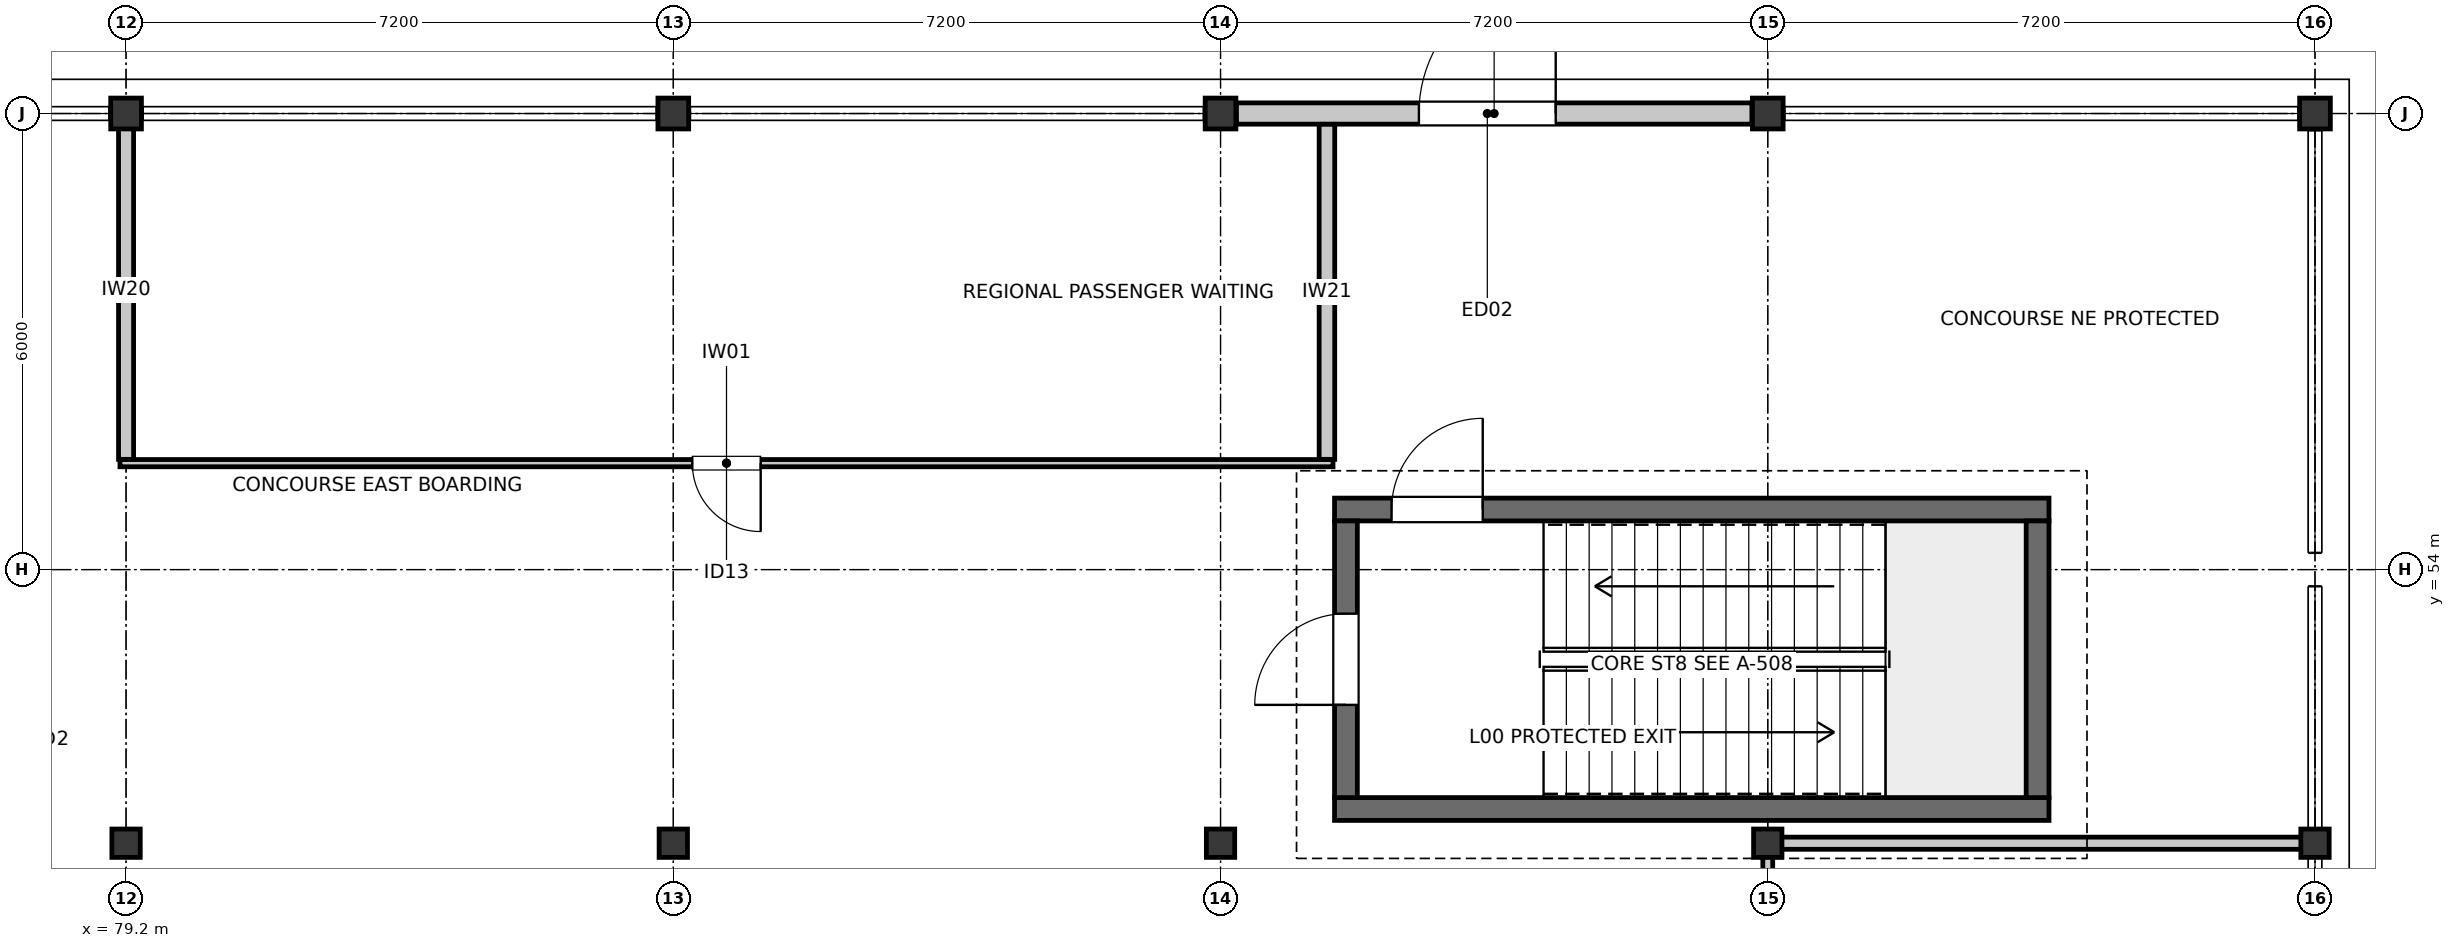
"""IFC4 building model, lengths in metres.
Left out: names, types, materials, properties, quantities, classifications, styles, units other than length and angle.
Written with IfcOpenShell. Run it as: python <this file> out.ifc"""

import sys

from ifc_helpers import new_model, si_unit, direction, frame, frame_2d, origin, origin_2d, place, context, subcontext, project, spatial, rectangle, i_section, extrude, element, fill, save


model = new_model("IFC4")
c1 = context("Model", 3, precision=1e-05, world=origin(), true_north=direction((0.0, 1.0)))
c2 = subcontext(c1, "Body", "Model", "MODEL_VIEW")
j1 = project(units=[si_unit("LENGTHUNIT", "METRE"), si_unit("PLANEANGLEUNIT", "RADIAN")], contexts=[c1])
p1 = place(None, origin())
s1 = spatial("IfcSite", under=j1, at=p1, CompositionType="ELEMENT")
p2 = place(p1, origin())
s2 = spatial("IfcBuilding", under=s1, at=p2, CompositionType="ELEMENT")
p3 = place(p2, origin())
s3 = spatial("IfcBuildingStorey", under=s2, at=p3, CompositionType="ELEMENT", Elevation=0.0)
p4 = place(p3, frame((79.2, 50.4, 0.0), z_axis=(0.0, 0.0, 1.0), x_axis=(1.0, 0.0, 0.0)))
e1 = element("IfcColumn", 1, at=p4, inside=s3, PredefinedType="COLUMN", context=c2, shape_type="SweptSolid", body=[
    extrude(i_section(OverallWidth=0.373, OverallDepth=0.373, WebThickness=0.016, FlangeThickness=0.026, FilletRadius=0.015, at=origin_2d()), origin(), (0.0, 0.0, 1.0), 5.4),
])
p5 = place(p3, frame((79.2, 60.0, 0.0), z_axis=(0.0, 0.0, 1.0), x_axis=(1.0, 0.0, 0.0)))
e2 = element("IfcColumn", 2, at=p5, inside=s3, PredefinedType="COLUMN", context=c2, shape_type="SweptSolid", body=[
    extrude(i_section(OverallWidth=0.404, OverallDepth=0.406, WebThickness=0.027, FlangeThickness=0.044, FilletRadius=0.015, at=origin_2d()), origin(), (0.0, 0.0, 1.0), 6.0),
])
p6 = place(p3, frame((86.4, 50.4, 0.0), z_axis=(0.0, 0.0, 1.0), x_axis=(1.0, 0.0, 0.0)))
e3 = element("IfcColumn", 3, at=p6, inside=s3, PredefinedType="COLUMN", context=c2, shape_type="SweptSolid", body=[
    extrude(i_section(OverallWidth=0.373, OverallDepth=0.373, WebThickness=0.016, FlangeThickness=0.026, FilletRadius=0.015, at=origin_2d()), origin(), (0.0, 0.0, 1.0), 5.4),
])
p7 = place(p3, frame((86.4, 60.0, 0.0), z_axis=(0.0, 0.0, 1.0), x_axis=(1.0, 0.0, 0.0)))
e4 = element("IfcColumn", 4, at=p7, inside=s3, PredefinedType="COLUMN", context=c2, shape_type="SweptSolid", body=[
    extrude(i_section(OverallWidth=0.404, OverallDepth=0.406, WebThickness=0.027, FlangeThickness=0.044, FilletRadius=0.015, at=origin_2d()), origin(), (0.0, 0.0, 1.0), 6.0),
])
p8 = place(p3, frame((93.6, 50.4, 0.0), z_axis=(0.0, 0.0, 1.0), x_axis=(1.0, 0.0, 0.0)))
e5 = element("IfcColumn", 5, at=p8, inside=s3, PredefinedType="COLUMN", context=c2, shape_type="SweptSolid", body=[
    extrude(i_section(OverallWidth=0.373, OverallDepth=0.373, WebThickness=0.016, FlangeThickness=0.026, FilletRadius=0.015, at=origin_2d()), origin(), (0.0, 0.0, 1.0), 5.4),
])
p9 = place(p3, frame((93.6, 60.0, 0.0), z_axis=(0.0, 0.0, 1.0), x_axis=(1.0, 0.0, 0.0)))
e6 = element("IfcColumn", 6, at=p9, inside=s3, PredefinedType="COLUMN", context=c2, shape_type="SweptSolid", body=[
    extrude(i_section(OverallWidth=0.404, OverallDepth=0.406, WebThickness=0.027, FlangeThickness=0.044, FilletRadius=0.015, at=origin_2d()), origin(), (0.0, 0.0, 1.0), 6.0),
])
p10 = place(p3, frame((100.8, 50.4, 0.0), z_axis=(0.0, 0.0, 1.0), x_axis=(1.0, 0.0, 0.0)))
e7 = element("IfcColumn", 7, at=p10, inside=s3, PredefinedType="COLUMN", context=c2, shape_type="SweptSolid", body=[
    extrude(i_section(OverallWidth=0.373, OverallDepth=0.373, WebThickness=0.016, FlangeThickness=0.026, FilletRadius=0.015, at=origin_2d()), origin(), (0.0, 0.0, 1.0), 5.4),
])
p11 = place(p3, frame((100.8, 60.0, 0.0), z_axis=(0.0, 0.0, 1.0), x_axis=(1.0, 0.0, 0.0)))
e8 = element("IfcColumn", 8, at=p11, inside=s3, PredefinedType="COLUMN", context=c2, shape_type="SweptSolid", body=[
    extrude(i_section(OverallWidth=0.404, OverallDepth=0.406, WebThickness=0.027, FlangeThickness=0.044, FilletRadius=0.015, at=origin_2d()), origin(), (0.0, 0.0, 1.0), 6.0),
])
p12 = place(p3, frame((108.0, 50.4, 0.0), z_axis=(0.0, 0.0, 1.0), x_axis=(1.0, 0.0, 0.0)))
e9 = element("IfcColumn", 9, at=p12, inside=s3, PredefinedType="COLUMN", context=c2, shape_type="SweptSolid", body=[
    extrude(i_section(OverallWidth=0.373, OverallDepth=0.373, WebThickness=0.016, FlangeThickness=0.026, FilletRadius=0.015, at=origin_2d()), origin(), (0.0, 0.0, 1.0), 5.4),
])
p13 = place(p3, frame((108.0, 60.0, 0.0), z_axis=(0.0, 0.0, 1.0), x_axis=(1.0, 0.0, 0.0)))
e10 = element("IfcColumn", 10, at=p13, inside=s3, PredefinedType="COLUMN", context=c2, shape_type="SweptSolid", body=[
    extrude(i_section(OverallWidth=0.404, OverallDepth=0.406, WebThickness=0.027, FlangeThickness=0.044, FilletRadius=0.015, at=origin_2d()), origin(), (0.0, 0.0, 1.0), 6.0),
])
p14 = place(p3, frame((93.809, 60.0, 0.0), z_axis=(0.0, 0.0, 1.0), x_axis=(1.0, 0.0, 0.0)))
e11 = element("IfcWall", 11, at=p14, inside=s3, PredefinedType="STANDARD", context=c2, shape_type="SweptSolid", body=[
    extrude(rectangle(XDim=6.782, YDim=0.28, at=frame_2d((3.391, 0.0))), origin(), (0.0, 0.0, 1.0), 4.482),
])
p15 = place(p14, frame((2.401, 0.0, 0.0)))
e12 = element("IfcOpeningElement", 12, at=p15, cuts=e11, PredefinedType="OPENING", context=c2, shape_type="SweptSolid", body=[
    extrude(rectangle(XDim=1.8, YDim=2.2, at=frame_2d((0.9, 1.1))), frame((0.0, 0.15, 0.0), z_axis=(0.0, -1.0, 0.0), x_axis=(1.0, 0.0, 0.0)), (0.0, 0.0, 1.0), 0.3),
])
p16 = place(p3, frame((104.5, 50.85, 0.0), z_axis=(0.0, 0.0, 1.0), x_axis=(-1.0, 0.0, 0.0)))
e13 = element("IfcWall", 13, at=p16, inside=s3, PredefinedType="SOLIDWALL", context=c2, shape_type="SweptSolid", body=[
    extrude(rectangle(XDim=9.4, YDim=0.3, at=frame_2d((4.7, 0.0))), origin(), (0.0, 0.0, 1.0), 5.18),
])
p17 = place(p3, frame((95.1, 54.79, 0.0), z_axis=(0.0, 0.0, 1.0), x_axis=(1.0, 0.0, 0.0)))
e14 = element("IfcWall", 14, at=p17, inside=s3, PredefinedType="SOLIDWALL", context=c2, shape_type="SweptSolid", body=[
    extrude(rectangle(XDim=9.4, YDim=0.3, at=frame_2d((4.7, 0.0))), origin(), (0.0, 0.0, 1.0), 5.18),
])
p18 = place(p17, frame((0.75, 0.0, 0.0)))
e15 = element("IfcOpeningElement", 15, at=p18, cuts=e14, PredefinedType="OPENING", context=c2, shape_type="SweptSolid", body=[
    extrude(rectangle(XDim=1.2, YDim=2.2, at=frame_2d((0.6, 1.1))), frame((0.0, 0.16, 0.0), z_axis=(0.0, -1.0, 0.0), x_axis=(1.0, 0.0, 0.0)), (0.0, 0.0, 1.0), 0.32),
])
p19 = place(p3, frame((95.25, 51.0, 0.0), z_axis=(0.0, 0.0, 1.0), x_axis=(0.0, 1.0, 0.0)))
e16 = element("IfcWall", 16, at=p19, inside=s3, PredefinedType="SOLIDWALL", context=c2, shape_type="SweptSolid", body=[
    extrude(rectangle(XDim=3.64, YDim=0.3, at=frame_2d((1.82, 0.0))), origin(), (0.0, 0.0, 1.0), 5.18),
])
p20 = place(p19, frame((1.22, 0.0, 0.0)))
e17 = element("IfcOpeningElement", 17, at=p20, cuts=e16, PredefinedType="OPENING", context=c2, shape_type="SweptSolid", body=[
    extrude(rectangle(XDim=1.2, YDim=2.2, at=frame_2d((0.6, 1.1))), frame((0.0, 0.16, 0.0), z_axis=(0.0, -1.0, 0.0), x_axis=(1.0, 0.0, 0.0)), (0.0, 0.0, 1.0), 0.32),
])
p21 = place(p3, frame((104.35, 54.64, 0.0), z_axis=(0.0, 0.0, 1.0), x_axis=(0.0, -1.0, 0.0)))
e18 = element("IfcWall", 18, at=p21, inside=s3, PredefinedType="SOLIDWALL", context=c2, shape_type="SweptSolid", body=[
    extrude(rectangle(XDim=3.64, YDim=0.3, at=frame_2d((1.82, 0.0))), origin(), (0.0, 0.0, 1.0), 5.18),
])
p22 = place(p3, frame((95.08, 55.4, 0.0), z_axis=(0.0, 0.0, 1.0), x_axis=(-1.0, 0.0, 0.0)))
e19 = element("IfcWall", 19, at=p22, inside=s3, PredefinedType="PARTITIONING", context=c2, shape_type="SweptSolid", body=[
    extrude(rectangle(XDim=15.96, YDim=0.095, at=frame_2d((7.98, 0.0))), origin(), (0.0, 0.0, 1.0), 4.477),
])
p23 = place(p22, frame((7.53, 0.0, 0.0)))
e20 = element("IfcOpeningElement", 20, at=p23, cuts=e19, PredefinedType="OPENING", context=c2, shape_type="SweptSolid", body=[
    extrude(rectangle(XDim=0.9, YDim=2.16, at=frame_2d((0.45, 1.08))), frame((0.0, 0.057, 0.0), z_axis=(0.0, -1.0, 0.0), x_axis=(1.0, 0.0, 0.0)), (0.0, 0.0, 1.0), 0.115),
])
p24 = place(p3, frame((100.72, 50.4, 0.0), z_axis=(0.0, 0.0, 1.0), x_axis=(1.0, 0.0, 0.0)))
e21 = element("IfcWall", 21, at=p24, inside=s3, PredefinedType="PARTITIONING", context=c2, shape_type="SweptSolid", body=[
    extrude(rectangle(XDim=7.198, YDim=0.16, at=frame_2d((3.599, 0.0))), origin(), (0.0, 0.0, 1.0), 4.477),
])
p25 = place(p3, frame((100.8, 18.08, 0.0), z_axis=(0.0, 0.0, 1.0), x_axis=(0.0, 1.0, 0.0)))
e22 = element("IfcWall", 22, at=p25, inside=s3, PredefinedType="PARTITIONING", context=c2, shape_type="SweptSolid", body=[
    extrude(rectangle(XDim=32.238, YDim=0.13, at=frame_2d((16.119, 0.0))), origin(), (0.0, 0.0, 1.0), 4.477),
])
p26 = place(p25, frame((15.639, 0.0, 0.0)))
e23 = element("IfcOpeningElement", 23, at=p26, cuts=e22, PredefinedType="OPENING", context=c2, shape_type="SweptSolid", body=[
    extrude(rectangle(XDim=0.96, YDim=2.16, at=frame_2d((0.48, 1.08))), frame((0.0, 0.075, 0.0), z_axis=(0.0, -1.0, 0.0), x_axis=(1.0, 0.0, 0.0)), (0.0, 0.0, 1.0), 0.15),
])
p27 = place(p25, frame((17.849, 0.0, 0.95)))
e24 = element("IfcOpeningElement", 24, at=p27, cuts=e22, PredefinedType="OPENING", context=c2, shape_type="SweptSolid", body=[
    extrude(rectangle(XDim=1.4, YDim=1.0, at=frame_2d((0.7, 0.5))), frame((0.0, 0.075, 0.0), z_axis=(0.0, -1.0, 0.0), x_axis=(1.0, 0.0, 0.0)), (0.0, 0.0, 1.0), 0.15),
])
p28 = place(p3, frame((79.2, 55.45, 0.0), z_axis=(0.0, 0.0, 1.0), x_axis=(0.0, 1.0, 0.0)))
e25 = element("IfcWall", 25, at=p28, inside=s3, PredefinedType="PARTITIONING", context=c2, shape_type="SweptSolid", body=[
    extrude(rectangle(XDim=4.468, YDim=0.198, at=frame_2d((2.234, 0.0))), origin(), (0.0, 0.0, 1.0), 4.477),
])
p29 = place(p3, frame((95.0, 59.858, 0.0), z_axis=(0.0, 0.0, 1.0), x_axis=(0.0, -1.0, 0.0)))
e26 = element("IfcWall", 26, at=p29, inside=s3, PredefinedType="PARTITIONING", context=c2, shape_type="SweptSolid", body=[
    extrude(rectangle(XDim=4.408, YDim=0.205, at=frame_2d((2.204, 0.0))), origin(), (0.0, 0.0, 1.0), 4.477),
])
p30 = place(p15, origin())
e27 = element("IfcDoor", 27, at=p30, inside=s3, OperationType="SINGLE_SWING_RIGHT", PredefinedType="DOOR", context=c2, shape_type="SweptSolid", body=[
    extrude(rectangle(XDim=1.8, YDim=2.2, at=frame_2d((0.9, 1.1))), frame((0.0, 0.025, 0.0), z_axis=(0.0, -1.0, 0.0), x_axis=(1.0, 0.0, 0.0)), (0.0, 0.0, 1.0), 0.05),
])
fill(e12, e27)
p31 = place(p18, origin())
e28 = element("IfcDoor", 28, at=p31, inside=s3, OperationType="SINGLE_SWING_RIGHT", PredefinedType="DOOR", context=c2, shape_type="SweptSolid", body=[
    extrude(rectangle(XDim=1.2, YDim=2.2, at=frame_2d((0.6, 1.1))), frame((0.0, 0.025, 0.0), z_axis=(0.0, -1.0, 0.0), x_axis=(1.0, 0.0, 0.0)), (0.0, 0.0, 1.0), 0.05),
])
fill(e15, e28)
p32 = place(p20, origin())
e29 = element("IfcDoor", 29, at=p32, inside=s3, OperationType="SINGLE_SWING_LEFT", PredefinedType="DOOR", context=c2, shape_type="SweptSolid", body=[
    extrude(rectangle(XDim=1.2, YDim=2.2, at=frame_2d((0.6, 1.1))), frame((0.0, 0.025, 0.0), z_axis=(0.0, -1.0, 0.0), x_axis=(1.0, 0.0, 0.0)), (0.0, 0.0, 1.0), 0.05),
])
fill(e17, e29)
p33 = place(p23, origin())
e30 = element("IfcDoor", 30, at=p33, inside=s3, OperationType="SINGLE_SWING_LEFT", PredefinedType="DOOR", context=c2, shape_type="SweptSolid", body=[
    extrude(rectangle(XDim=0.9, YDim=2.16, at=frame_2d((0.45, 1.08))), frame((0.0, 0.025, 0.0), z_axis=(0.0, -1.0, 0.0), x_axis=(1.0, 0.0, 0.0)), (0.0, 0.0, 1.0), 0.05),
])
fill(e20, e30)
save(model, sys.argv[1])
